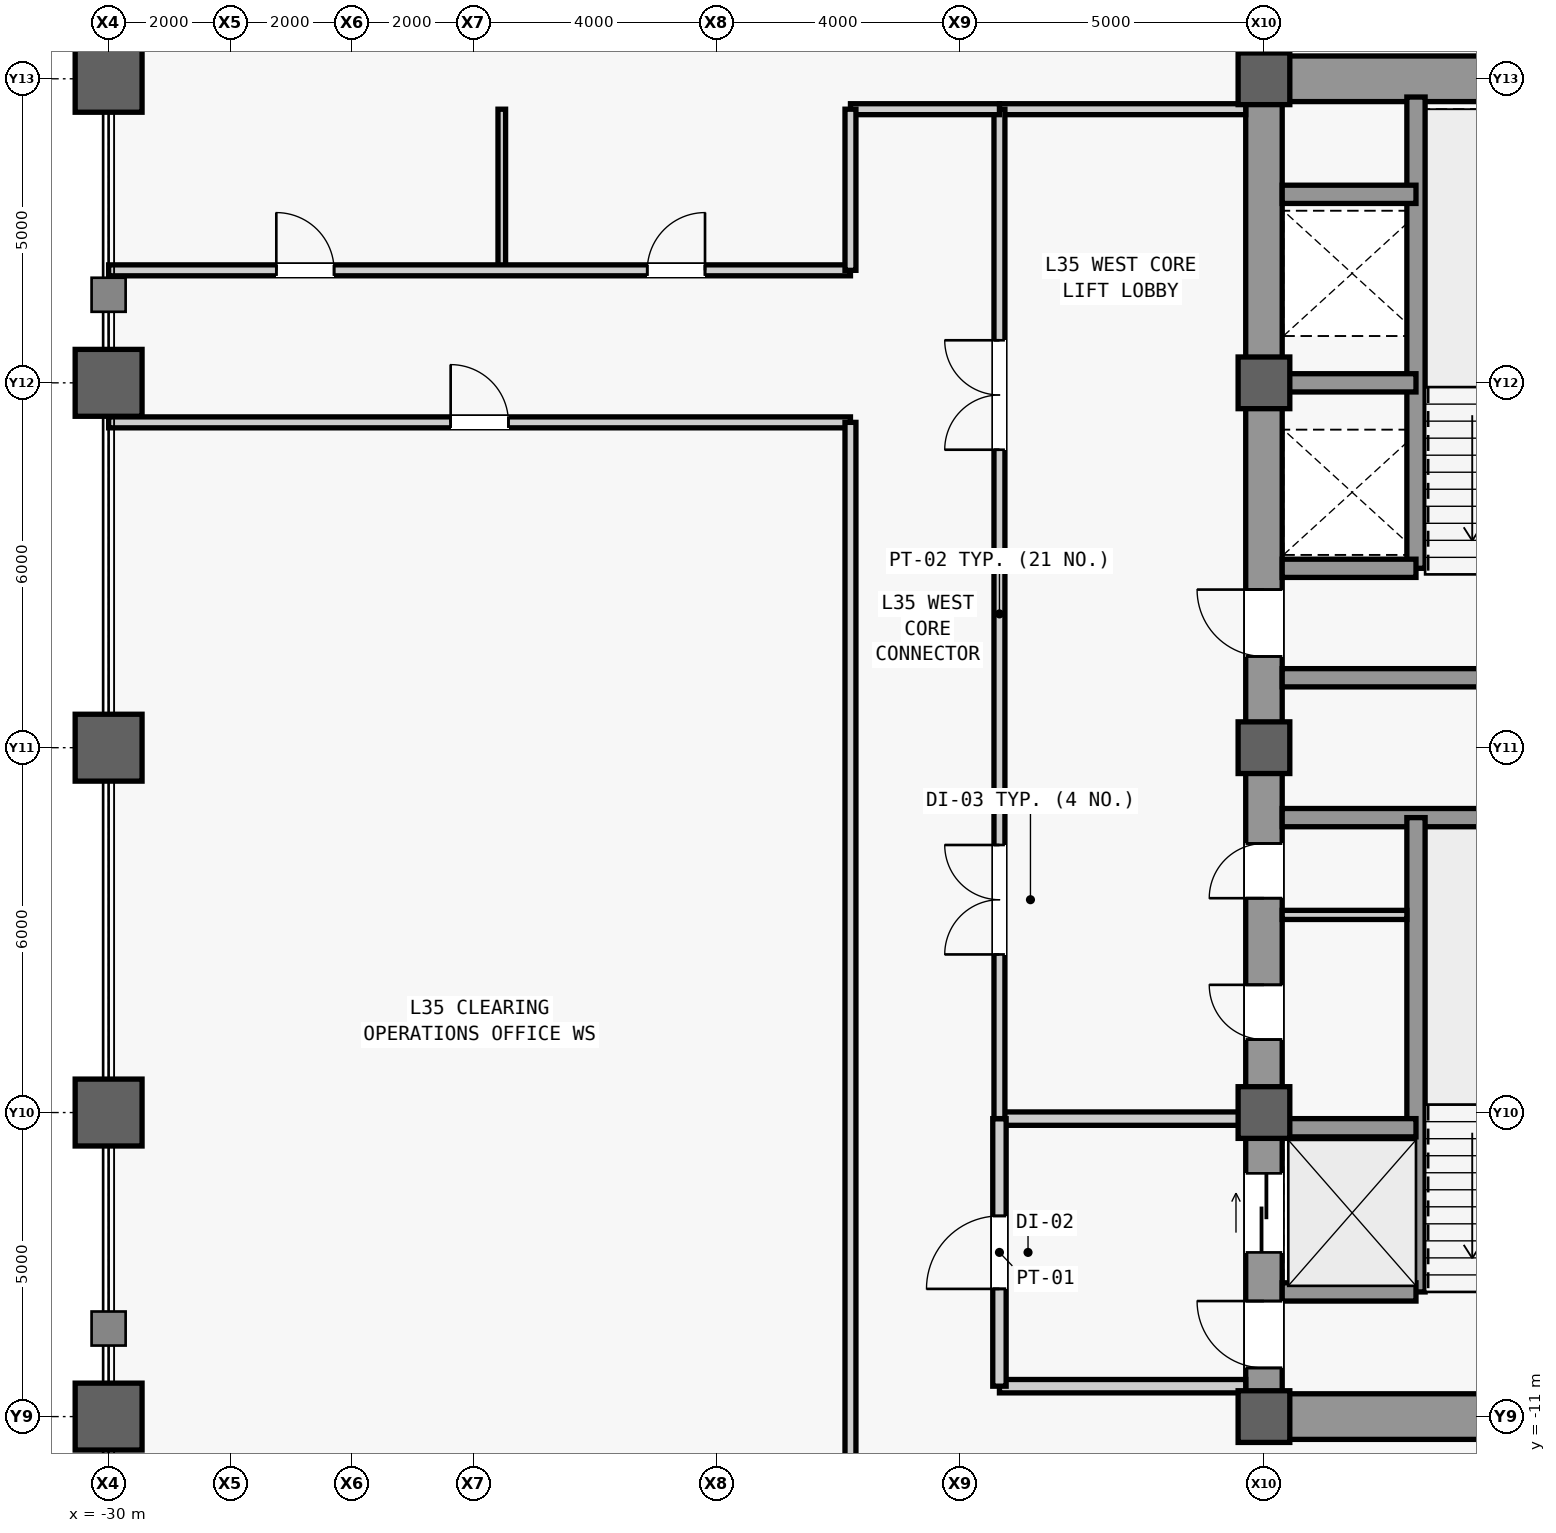
"""IFC4 building model, lengths in metres.
Left out: names, types, materials, properties, quantities, classifications, styles, units other than length and angle.
Written with IfcOpenShell. Run it as: python <this file> out.ifc"""

import sys

from ifc_helpers import new_model, si_unit, direction, frame, frame_2d, origin, origin_2d, place, context, subcontext, project, spatial, rectangle, hollow_rectangle, extrude, source, transform, mapped, element, fill, save


model = new_model("IFC4")
c1 = context("Model", 3, precision=1e-05, world=origin(), true_north=direction((0.0, 1.0)))
c2 = subcontext(c1, "Body", "Model", "MODEL_VIEW")
j1 = project(units=[si_unit("LENGTHUNIT", "METRE"), si_unit("PLANEANGLEUNIT", "RADIAN")], contexts=[c1])
p1 = place(None, origin())
s1 = spatial("IfcSite", under=j1, at=p1, CompositionType="ELEMENT")
p2 = place(p1, origin())
s2 = spatial("IfcBuilding", under=s1, at=p2, CompositionType="ELEMENT")
p3 = place(p2, frame((0.0, 0.0, 155.1)))
s3 = spatial("IfcBuildingStorey", under=s2, at=p3, CompositionType="ELEMENT", Elevation=155.1)
m1 = source(origin(), c2, "Body", "SweptSolid", [
    extrude(rectangle(XDim=22.0, YDim=0.6, at=frame_2d((11.0, 0.0))), origin(), (0.0, 0.0, 1.0), 3.78),
])
p4 = place(p3, frame((-11.0, -11.0, 0.0), z_axis=(0.0, 0.0, 1.0), x_axis=(0.0, 1.0, 0.0)))
e1 = element("IfcWall", 1, at=p4, inside=s3, PredefinedType="SHEAR", context=c2, shape_type="MappedRepresentation", body=[
    mapped(m1, transform((0.0, 0.0, 0.0), scale=1.0)),
])
m2 = source(origin(), c2, "Body", "SweptSolid", [
    extrude(rectangle(XDim=1.1, YDim=2.2, at=frame_2d((0.55, 1.1))), frame((0.0, 0.31, 0.0), z_axis=(0.0, -1.0, 0.0), x_axis=(1.0, 0.0, 0.0)), (0.0, 0.0, 1.0), 0.62),
])
p5 = place(p4, frame((0.8, 0.0, 0.0)))
e2 = element("IfcOpeningElement", 2, at=p5, cuts=e1, PredefinedType="OPENING", context=c2, shape_type="MappedRepresentation", body=[
    mapped(m2, transform((0.0, 0.0, 0.0), scale=1.0)),
])
p6 = place(p4, frame((12.5, 0.0, 0.0)))
e3 = element("IfcOpeningElement", 3, at=p6, cuts=e1, PredefinedType="OPENING", context=c2, shape_type="MappedRepresentation", body=[
    mapped(m2, transform((0.0, 0.0, 0.0), scale=1.0)),
])
m3 = source(origin(), c2, "Body", "SweptSolid", [
    extrude(rectangle(XDim=0.9, YDim=2.15, at=frame_2d((0.45, 1.075))), frame((0.0, 0.31, 0.0), z_axis=(0.0, -1.0, 0.0), x_axis=(1.0, 0.0, 0.0)), (0.0, 0.0, 1.0), 0.62),
])
p7 = place(p4, frame((6.2, 0.0, 0.0)))
e4 = element("IfcOpeningElement", 4, at=p7, cuts=e1, PredefinedType="OPENING", context=c2, shape_type="MappedRepresentation", body=[
    mapped(m3, transform((0.0, 0.0, 0.0), scale=1.0)),
])
p8 = place(p4, frame((8.525, 0.0, 0.0)))
e5 = element("IfcOpeningElement", 5, at=p8, cuts=e1, PredefinedType="OPENING", context=c2, shape_type="MappedRepresentation", body=[
    mapped(m3, transform((0.0, 0.0, 0.0), scale=1.0)),
])
m4 = source(origin(), c2, "Body", "SweptSolid", [
    extrude(rectangle(XDim=1.3, YDim=2.3, at=frame_2d((0.65, 1.15))), frame((0.0, 0.31, 0.0), z_axis=(0.0, -1.0, 0.0), x_axis=(1.0, 0.0, 0.0)), (0.0, 0.0, 1.0), 0.62),
])
p9 = place(p4, frame((2.7, 0.0, 0.0)))
e6 = element("IfcOpeningElement", 6, at=p9, cuts=e1, PredefinedType="OPENING", context=c2, shape_type="MappedRepresentation", body=[
    mapped(m4, transform((0.0, 0.0, 0.0), scale=1.0)),
])
m5 = source(origin(), c2, "Body", "SweptSolid", [
    extrude(rectangle(XDim=5.85, YDim=0.75, at=frame_2d((2.925, 0.0))), origin(), (0.0, 0.0, 1.0), 3.78),
])
for number, where, z_axis, x_axis in (
    (7, (-10.7, -11.0, 0.0), (0.0, 0.0, 1.0), (1.0, 0.0, 0.0)),
    (8, (-10.7, 11.0, 0.0), (0.0, 0.0, 1.0), (1.0, 0.0, 0.0)),
):
    element("IfcWall", number, at=place(p3, frame(where, z_axis=z_axis, x_axis=x_axis)), inside=s3, PredefinedType="SHEAR", context=c2, shape_type="MappedRepresentation", body=[
        mapped(m5, transform((0.0, 0.0, 0.0), scale=1.0)),
    ])
m6 = source(origin(), c2, "Body", "SweptSolid", [
    extrude(rectangle(XDim=5.6, YDim=0.3, at=frame_2d((2.8, 0.0))), origin(), (0.0, 0.0, 1.0), 3.78),
])
for number, where, z_axis, x_axis in (
    (9, (-10.7, -1.15, 0.0), (0.0, 0.0, 1.0), (1.0, 0.0, 0.0)),
    (10, (-10.7, 1.15, 0.0), (0.0, 0.0, 1.0), (1.0, 0.0, 0.0)),
):
    element("IfcWall", number, at=place(p3, frame(where, z_axis=z_axis, x_axis=x_axis)), inside=s3, PredefinedType="SHEAR", context=c2, shape_type="MappedRepresentation", body=[
        mapped(m6, transform((0.0, 0.0, 0.0), scale=1.0)),
    ])
m7 = source(origin(), c2, "Body", "SweptSolid", [
    extrude(hollow_rectangle(XDim=1.1, YDim=1.1, WallThickness=0.06, at=origin_2d()), origin(), (0.0, 0.0, 1.0), 4.0),
])
for number, where, z_axis, x_axis in (
    (11, (-30.0, -11.0, 0.0), (0.0, 0.0, 1.0), (1.0, 0.0, 0.0)),
    (12, (-30.0, -6.0, 0.0), (0.0, 0.0, 1.0), (1.0, 0.0, 0.0)),
    (13, (-30.0, 0.0, 0.0), (0.0, 0.0, 1.0), (1.0, 0.0, 0.0)),
    (14, (-30.0, 6.0, 0.0), (0.0, 0.0, 1.0), (1.0, 0.0, 0.0)),
    (15, (-30.0, 11.0, 0.0), (0.0, 0.0, 1.0), (1.0, 0.0, 0.0)),
):
    element("IfcColumn", number, at=place(p3, frame(where, z_axis=z_axis, x_axis=x_axis)), inside=s3, PredefinedType="COLUMN", context=c2, shape_type="MappedRepresentation", body=[
        mapped(m7, transform((0.0, 0.0, 0.0), scale=1.0)),
    ])
m8 = source(origin(), c2, "Body", "SweptSolid", [
    extrude(rectangle(XDim=0.85, YDim=0.85, at=origin_2d()), origin(), (0.0, 0.0, 1.0), 4.0),
])
for number, where, z_axis, x_axis in (
    (16, (-11.0, -11.0, 0.0), (0.0, 0.0, 1.0), (1.0, 0.0, 0.0)),
    (17, (-11.0, -6.0, 0.0), (0.0, 0.0, 1.0), (1.0, 0.0, 0.0)),
    (18, (-11.0, 0.0, 0.0), (0.0, 0.0, 1.0), (1.0, 0.0, 0.0)),
    (19, (-11.0, 6.0, 0.0), (0.0, 0.0, 1.0), (1.0, 0.0, 0.0)),
    (20, (-11.0, 11.0, 0.0), (0.0, 0.0, 1.0), (1.0, 0.0, 0.0)),
):
    element("IfcColumn", number, at=place(p3, frame(where, z_axis=z_axis, x_axis=x_axis)), inside=s3, PredefinedType="COLUMN", context=c2, shape_type="MappedRepresentation", body=[
        mapped(m8, transform((0.0, 0.0, 0.0), scale=1.0)),
    ])
m9 = source(origin(), c2, "Body", "SweptSolid", [
    extrude(rectangle(XDim=7.8, YDim=0.3, at=frame_2d((3.9, 0.0))), origin(), (0.0, 0.0, 1.0), 3.78),
])
p10 = place(p3, frame((-8.5, -8.95, 0.0), z_axis=(0.0, 0.0, 1.0), x_axis=(0.0, 1.0, 0.0)))
e21 = element("IfcWall", 21, at=p10, inside=s3, PredefinedType="SHEAR", context=c2, shape_type="MappedRepresentation", body=[
    mapped(m9, transform((0.0, 0.0, 0.0), scale=1.0)),
])
m10 = source(origin(), c2, "Body", "SweptSolid", [
    extrude(rectangle(XDim=2.2, YDim=0.3, at=frame_2d((1.1, 0.0))), origin(), (0.0, 0.0, 1.0), 3.78),
])
for number, where, z_axis, x_axis in (
    (22, (-10.7, -8.95, 0.0), (0.0, 0.0, 1.0), (1.0, 0.0, 0.0)),
    (23, (-10.7, -6.25, 0.0), (0.0, 0.0, 1.0), (1.0, 0.0, 0.0)),
):
    element("IfcWall", number, at=place(p3, frame(where, z_axis=z_axis, x_axis=x_axis)), inside=s3, PredefinedType="SHEAR", context=c2, shape_type="MappedRepresentation", body=[
        mapped(m10, transform((0.0, 0.0, 0.0), scale=1.0)),
    ])
m11 = source(origin(), c2, "Body", "SweptSolid", [
    extrude(rectangle(XDim=7.75, YDim=0.3, at=frame_2d((3.875, 0.0))), origin(), (0.0, 0.0, 1.0), 3.78),
])
p11 = place(p3, frame((-8.5, 2.95, 0.0), z_axis=(0.0, 0.0, 1.0), x_axis=(0.0, 1.0, 0.0)))
e24 = element("IfcWall", 24, at=p11, inside=s3, PredefinedType="SHEAR", context=c2, shape_type="MappedRepresentation", body=[
    mapped(m11, transform((0.0, 0.0, 0.0), scale=1.0)),
])
for number, where, z_axis, x_axis in (
    (25, (-10.7, 2.95, 0.0), (0.0, 0.0, 1.0), (1.0, 0.0, 0.0)),
    (26, (-10.7, 6.0, 0.0), (0.0, 0.0, 1.0), (1.0, 0.0, 0.0)),
    (27, (-10.7, 9.1, 0.0), (0.0, 0.0, 1.0), (1.0, 0.0, 0.0)),
):
    element("IfcWall", number, at=place(p3, frame(where, z_axis=z_axis, x_axis=x_axis)), inside=s3, PredefinedType="SHEAR", context=c2, shape_type="MappedRepresentation", body=[
        mapped(m10, transform((0.0, 0.0, 0.0), scale=1.0)),
    ])
m12 = source(origin(), c2, "Body", "SweptSolid", [
    extrude(rectangle(XDim=2.05, YDim=0.15, at=frame_2d((1.025, 0.0))), origin(), (0.0, 0.0, 1.0), 3.78),
])
p12 = place(p3, frame((-10.7, -2.75, 0.0), z_axis=(0.0, 0.0, 1.0), x_axis=(1.0, 0.0, 0.0)))
e28 = element("IfcWall", 28, at=p12, inside=s3, PredefinedType="PARTITIONING", context=c2, shape_type="MappedRepresentation", body=[
    mapped(m12, transform((0.0, 0.0, 0.0), scale=1.0)),
])
m13 = source(origin(), c2, "Body", "SweptSolid", [
    extrude(rectangle(XDim=4.05, YDim=0.22, at=frame_2d((2.025, 0.0))), origin(), (0.0, 0.0, 1.0), 3.78),
])
p13 = place(p3, frame((-15.35, -10.5, 0.0), z_axis=(0.0, 0.0, 1.0), x_axis=(1.0, 0.0, 0.0)))
e29 = element("IfcWall", 29, at=p13, inside=s3, PredefinedType="PARTITIONING", context=c2, shape_type="MappedRepresentation", body=[
    mapped(m13, transform((0.0, 0.0, 0.0), scale=1.0)),
])
m14 = source(origin(), c2, "Body", "SweptSolid", [
    extrude(rectangle(XDim=4.05, YDim=0.22, at=frame_2d((2.025, 0.0))), origin(), (0.0, 0.0, 1.0), 3.007),
])
p14 = place(p3, frame((-15.35, -6.1, 0.0), z_axis=(0.0, 0.0, 1.0), x_axis=(1.0, 0.0, 0.0)))
e30 = element("IfcWall", 30, at=p14, inside=s3, PredefinedType="PARTITIONING", context=c2, shape_type="MappedRepresentation", body=[
    mapped(m14, transform((0.0, 0.0, 0.0), scale=1.0)),
])
m15 = source(origin(), c2, "Body", "SweptSolid", [
    extrude(rectangle(XDim=4.4, YDim=0.22, at=frame_2d((2.2, 0.0))), origin(), (0.0, 0.0, 1.0), 3.78),
])
p15 = place(p3, frame((-15.35, -10.5, 0.0), z_axis=(0.0, 0.0, 1.0), x_axis=(0.0, 1.0, 0.0)))
e31 = element("IfcWall", 31, at=p15, inside=s3, PredefinedType="PARTITIONING", context=c2, shape_type="MappedRepresentation", body=[
    mapped(m15, transform((0.0, 0.0, 0.0), scale=1.0)),
])
m16 = source(origin(), c2, "Body", "SweptSolid", [
    extrude(rectangle(XDim=1.2, YDim=2.2, at=frame_2d((0.6, 1.1))), frame((0.0, 0.12, 0.0), z_axis=(0.0, -1.0, 0.0), x_axis=(1.0, 0.0, 0.0)), (0.0, 0.0, 1.0), 0.24),
])
p16 = place(p15, frame((1.6, 0.0, 0.0)))
e32 = element("IfcOpeningElement", 32, at=p16, cuts=e31, PredefinedType="OPENING", context=c2, shape_type="MappedRepresentation", body=[
    mapped(m16, transform((0.0, 0.0, 0.0), scale=1.0)),
])
m17 = source(origin(), c2, "Body", "SweptSolid", [
    extrude(rectangle(XDim=4.05, YDim=0.18, at=frame_2d((2.025, 0.0))), origin(), (0.0, 0.0, 1.0), 3.78),
])
p17 = place(p3, frame((-15.35, 10.5, 0.0), z_axis=(0.0, 0.0, 1.0), x_axis=(1.0, 0.0, 0.0)))
e33 = element("IfcWall", 33, at=p17, inside=s3, PredefinedType="PARTITIONING", context=c2, shape_type="MappedRepresentation", body=[
    mapped(m17, transform((0.0, 0.0, 0.0), scale=1.0)),
])
m18 = source(origin(), c2, "Body", "SweptSolid", [
    extrude(rectangle(XDim=16.6, YDim=0.18, at=frame_2d((8.3, 0.0))), origin(), (0.0, 0.0, 1.0), 3.78),
])
p18 = place(p3, frame((-15.35, -6.1, 0.0), z_axis=(0.0, 0.0, 1.0), x_axis=(0.0, 1.0, 0.0)))
e34 = element("IfcWall", 34, at=p18, inside=s3, PredefinedType="PARTITIONING", context=c2, shape_type="MappedRepresentation", body=[
    mapped(m18, transform((0.0, 0.0, 0.0), scale=1.0)),
])
m19 = source(origin(), c2, "Body", "SweptSolid", [
    extrude(rectangle(XDim=1.8, YDim=2.25, at=frame_2d((0.9, 1.125))), frame((0.0, 0.1, 0.0), z_axis=(0.0, -1.0, 0.0), x_axis=(1.0, 0.0, 0.0)), (0.0, 0.0, 1.0), 0.2),
])
p19 = place(p18, frame((2.7, 0.0, 0.0)))
e35 = element("IfcOpeningElement", 35, at=p19, cuts=e34, PredefinedType="OPENING", context=c2, shape_type="MappedRepresentation", body=[
    mapped(m19, transform((0.0, 0.0, 0.0), scale=1.0)),
])
p20 = place(p18, frame((11.0, 0.0, 0.0)))
e36 = element("IfcOpeningElement", 36, at=p20, cuts=e34, PredefinedType="OPENING", context=c2, shape_type="MappedRepresentation", body=[
    mapped(m19, transform((0.0, 0.0, 0.0), scale=1.0)),
])
m20 = source(origin(), c2, "Body", "SweptSolid", [
    extrude(rectangle(XDim=2.45, YDim=0.18, at=frame_2d((1.225, 0.0))), origin(), (0.0, 0.0, 1.0), 3.78),
])
p21 = place(p3, frame((-17.8, 10.5, 0.0), z_axis=(0.0, 0.0, 1.0), x_axis=(1.0, 0.0, 0.0)))
e37 = element("IfcWall", 37, at=p21, inside=s3, PredefinedType="PARTITIONING", context=c2, shape_type="MappedRepresentation", body=[
    mapped(m20, transform((0.0, 0.0, 0.0), scale=1.0)),
])
m21 = source(origin(), c2, "Body", "SweptSolid", [
    extrude(rectangle(XDim=12.2, YDim=0.18, at=frame_2d((6.1, 0.0))), origin(), (0.0, 0.0, 1.0), 3.78),
])
p22 = place(p3, frame((-30.0, 5.35, 0.0), z_axis=(0.0, 0.0, 1.0), x_axis=(1.0, 0.0, 0.0)))
e38 = element("IfcWall", 38, at=p22, inside=s3, PredefinedType="PARTITIONING", context=c2, shape_type="MappedRepresentation", body=[
    mapped(m21, transform((0.0, 0.0, 0.0), scale=1.0)),
])
m22 = source(origin(), c2, "Body", "SweptSolid", [
    extrude(rectangle(XDim=0.95, YDim=2.15, at=frame_2d((0.475, 1.075))), frame((0.0, 0.1, 0.0), z_axis=(0.0, -1.0, 0.0), x_axis=(1.0, 0.0, 0.0)), (0.0, 0.0, 1.0), 0.2),
])
p23 = place(p22, frame((5.625, 0.0, 0.0)))
e39 = element("IfcOpeningElement", 39, at=p23, cuts=e38, PredefinedType="OPENING", context=c2, shape_type="MappedRepresentation", body=[
    mapped(m22, transform((0.0, 0.0, 0.0), scale=1.0)),
])
m23 = source(origin(), c2, "Body", "SweptSolid", [
    extrude(rectangle(XDim=19.55, YDim=0.18, at=frame_2d((9.775, 0.0))), origin(), (0.0, 0.0, 1.0), 3.78),
])
p24 = place(p3, frame((-17.8, -14.2, 0.0), z_axis=(0.0, 0.0, 1.0), x_axis=(0.0, 1.0, 0.0)))
e40 = element("IfcWall", 40, at=p24, inside=s3, PredefinedType="PARTITIONING", context=c2, shape_type="MappedRepresentation", body=[
    mapped(m23, transform((0.0, 0.0, 0.0), scale=1.0)),
])
m24 = source(origin(), c2, "Body", "SweptSolid", [
    extrude(rectangle(XDim=2.65, YDim=0.125, at=frame_2d((1.325, 0.0))), origin(), (0.0, 0.0, 1.0), 3.78),
])
p25 = place(p3, frame((-23.534, 7.85, 0.0), z_axis=(0.0, 0.0, 1.0), x_axis=(0.0, 1.0, 0.0)))
e41 = element("IfcWall", 41, at=p25, inside=s3, PredefinedType="PARTITIONING", context=c2, shape_type="MappedRepresentation", body=[
    mapped(m24, transform((0.0, 0.0, 0.0), scale=1.0)),
])
p26 = place(p3, frame((-30.0, 7.85, 0.0), z_axis=(0.0, 0.0, 1.0), x_axis=(1.0, 0.0, 0.0)))
e42 = element("IfcWall", 42, at=p26, inside=s3, PredefinedType="PARTITIONING", context=c2, shape_type="MappedRepresentation", body=[
    mapped(m21, transform((0.0, 0.0, 0.0), scale=1.0)),
])
p27 = place(p26, frame((2.758, 0.0, 0.0)))
e43 = element("IfcOpeningElement", 43, at=p27, cuts=e42, PredefinedType="OPENING", context=c2, shape_type="MappedRepresentation", body=[
    mapped(m22, transform((0.0, 0.0, 0.0), scale=1.0)),
])
p28 = place(p26, frame((8.858, 0.0, 0.0)))
e44 = element("IfcOpeningElement", 44, at=p28, cuts=e42, PredefinedType="OPENING", context=c2, shape_type="MappedRepresentation", body=[
    mapped(m22, transform((0.0, 0.0, 0.0), scale=1.0)),
])
m25 = source(origin(), c2, "Body", "SweptSolid", [
    extrude(rectangle(XDim=2.65, YDim=0.18, at=frame_2d((1.325, 0.0))), origin(), (0.0, 0.0, 1.0), 3.78),
])
p29 = place(p3, frame((-17.8, 7.85, 0.0), z_axis=(0.0, 0.0, 1.0), x_axis=(0.0, 1.0, 0.0)))
e45 = element("IfcWall", 45, at=p29, inside=s3, PredefinedType="PARTITIONING", context=c2, shape_type="MappedRepresentation", body=[
    mapped(m25, transform((0.0, 0.0, 0.0), scale=1.0)),
])
m26 = source(origin(), c2, "Body", "SweptSolid", [
    extrude(rectangle(XDim=1.1, YDim=2.2, at=frame_2d((0.55, 1.1))), frame((0.0, 0.025, 0.0), z_axis=(0.0, -1.0, 0.0), x_axis=(1.0, 0.0, 0.0)), (0.0, 0.0, 1.0), 0.05),
])
p30 = place(p5, origin())
e46 = element("IfcDoor", 46, at=p30, inside=s3, OperationType="SINGLE_SWING_RIGHT", PredefinedType="DOOR", context=c2, shape_type="MappedRepresentation", body=[
    mapped(m26, transform((0.0, 0.0, 0.0), scale=1.0)),
])
fill(e2, e46)
p31 = place(p6, origin())
e47 = element("IfcDoor", 47, at=p31, inside=s3, OperationType="SINGLE_SWING_RIGHT", PredefinedType="DOOR", context=c2, shape_type="MappedRepresentation", body=[
    mapped(m26, transform((0.0, 0.0, 0.0), scale=1.0)),
])
fill(e3, e47)
m27 = source(origin(), c2, "Body", "SweptSolid", [
    extrude(rectangle(XDim=0.9, YDim=2.15, at=frame_2d((0.45, 1.075))), frame((0.0, 0.025, 0.0), z_axis=(0.0, -1.0, 0.0), x_axis=(1.0, 0.0, 0.0)), (0.0, 0.0, 1.0), 0.05),
])
p32 = place(p7, origin())
e48 = element("IfcDoor", 48, at=p32, inside=s3, OperationType="SINGLE_SWING_RIGHT", PredefinedType="DOOR", context=c2, shape_type="MappedRepresentation", body=[
    mapped(m27, transform((0.0, 0.0, 0.0), scale=1.0)),
])
fill(e4, e48)
p33 = place(p8, origin())
e49 = element("IfcDoor", 49, at=p33, inside=s3, OperationType="SINGLE_SWING_LEFT", PredefinedType="DOOR", context=c2, shape_type="MappedRepresentation", body=[
    mapped(m27, transform((0.0, 0.0, 0.0), scale=1.0)),
])
fill(e5, e49)
m28 = source(origin(), c2, "Body", "SweptSolid", [
    extrude(rectangle(XDim=1.2, YDim=2.2, at=frame_2d((0.6, 1.1))), frame((0.0, 0.025, 0.0), z_axis=(0.0, -1.0, 0.0), x_axis=(1.0, 0.0, 0.0)), (0.0, 0.0, 1.0), 0.05),
])
p34 = place(p16, origin())
e50 = element("IfcDoor", 50, at=p34, inside=s3, OperationType="SINGLE_SWING_LEFT", PredefinedType="DOOR", context=c2, shape_type="MappedRepresentation", body=[
    mapped(m28, transform((0.0, 0.0, 0.0), scale=1.0)),
])
fill(e32, e50)
m29 = source(origin(), c2, "Body", "SweptSolid", [
    extrude(rectangle(XDim=1.8, YDim=2.25, at=frame_2d((0.9, 1.125))), frame((0.0, 0.025, 0.0), z_axis=(0.0, -1.0, 0.0), x_axis=(1.0, 0.0, 0.0)), (0.0, 0.0, 1.0), 0.05),
])
p35 = place(p19, origin())
e51 = element("IfcDoor", 51, at=p35, inside=s3, OperationType="SINGLE_SWING_LEFT", PredefinedType="DOOR", context=c2, shape_type="MappedRepresentation", body=[
    mapped(m29, transform((0.0, 0.0, 0.0), scale=1.0)),
])
fill(e35, e51)
p36 = place(p20, origin())
e52 = element("IfcDoor", 52, at=p36, inside=s3, OperationType="SINGLE_SWING_RIGHT", PredefinedType="DOOR", context=c2, shape_type="MappedRepresentation", body=[
    mapped(m29, transform((0.0, 0.0, 0.0), scale=1.0)),
])
fill(e36, e52)
m30 = source(origin(), c2, "Body", "SweptSolid", [
    extrude(rectangle(XDim=0.95, YDim=2.15, at=frame_2d((0.475, 1.075))), frame((0.0, 0.025, 0.0), z_axis=(0.0, -1.0, 0.0), x_axis=(1.0, 0.0, 0.0)), (0.0, 0.0, 1.0), 0.05),
])
p37 = place(p23, origin())
e53 = element("IfcDoor", 53, at=p37, inside=s3, OperationType="SINGLE_SWING_LEFT", PredefinedType="DOOR", context=c2, shape_type="MappedRepresentation", body=[
    mapped(m30, transform((0.0, 0.0, 0.0), scale=1.0)),
])
fill(e39, e53)
p38 = place(p27, origin())
e54 = element("IfcDoor", 54, at=p38, inside=s3, OperationType="SINGLE_SWING_LEFT", PredefinedType="DOOR", context=c2, shape_type="MappedRepresentation", body=[
    mapped(m30, transform((0.0, 0.0, 0.0), scale=1.0)),
])
fill(e43, e54)
p39 = place(p28, origin())
e55 = element("IfcDoor", 55, at=p39, inside=s3, OperationType="SINGLE_SWING_RIGHT", PredefinedType="DOOR", context=c2, shape_type="MappedRepresentation", body=[
    mapped(m30, transform((0.0, 0.0, 0.0), scale=1.0)),
])
fill(e44, e55)
m31 = source(origin(), c2, "Body", "SweptSolid", [
    extrude(rectangle(XDim=1.3, YDim=2.3, at=frame_2d((0.65, 1.15))), frame((0.0, 0.025, 0.0), z_axis=(0.0, -1.0, 0.0), x_axis=(1.0, 0.0, 0.0)), (0.0, 0.0, 1.0), 0.05),
])
p40 = place(p9, origin())
e56 = element("IfcDoor", 56, at=p40, inside=s3, OperationType="SLIDING_TO_LEFT", PredefinedType="DOOR", context=c2, shape_type="MappedRepresentation", body=[
    mapped(m31, transform((0.0, 0.0, 0.0), scale=1.0)),
])
fill(e6, e56)
save(model, sys.argv[1])
